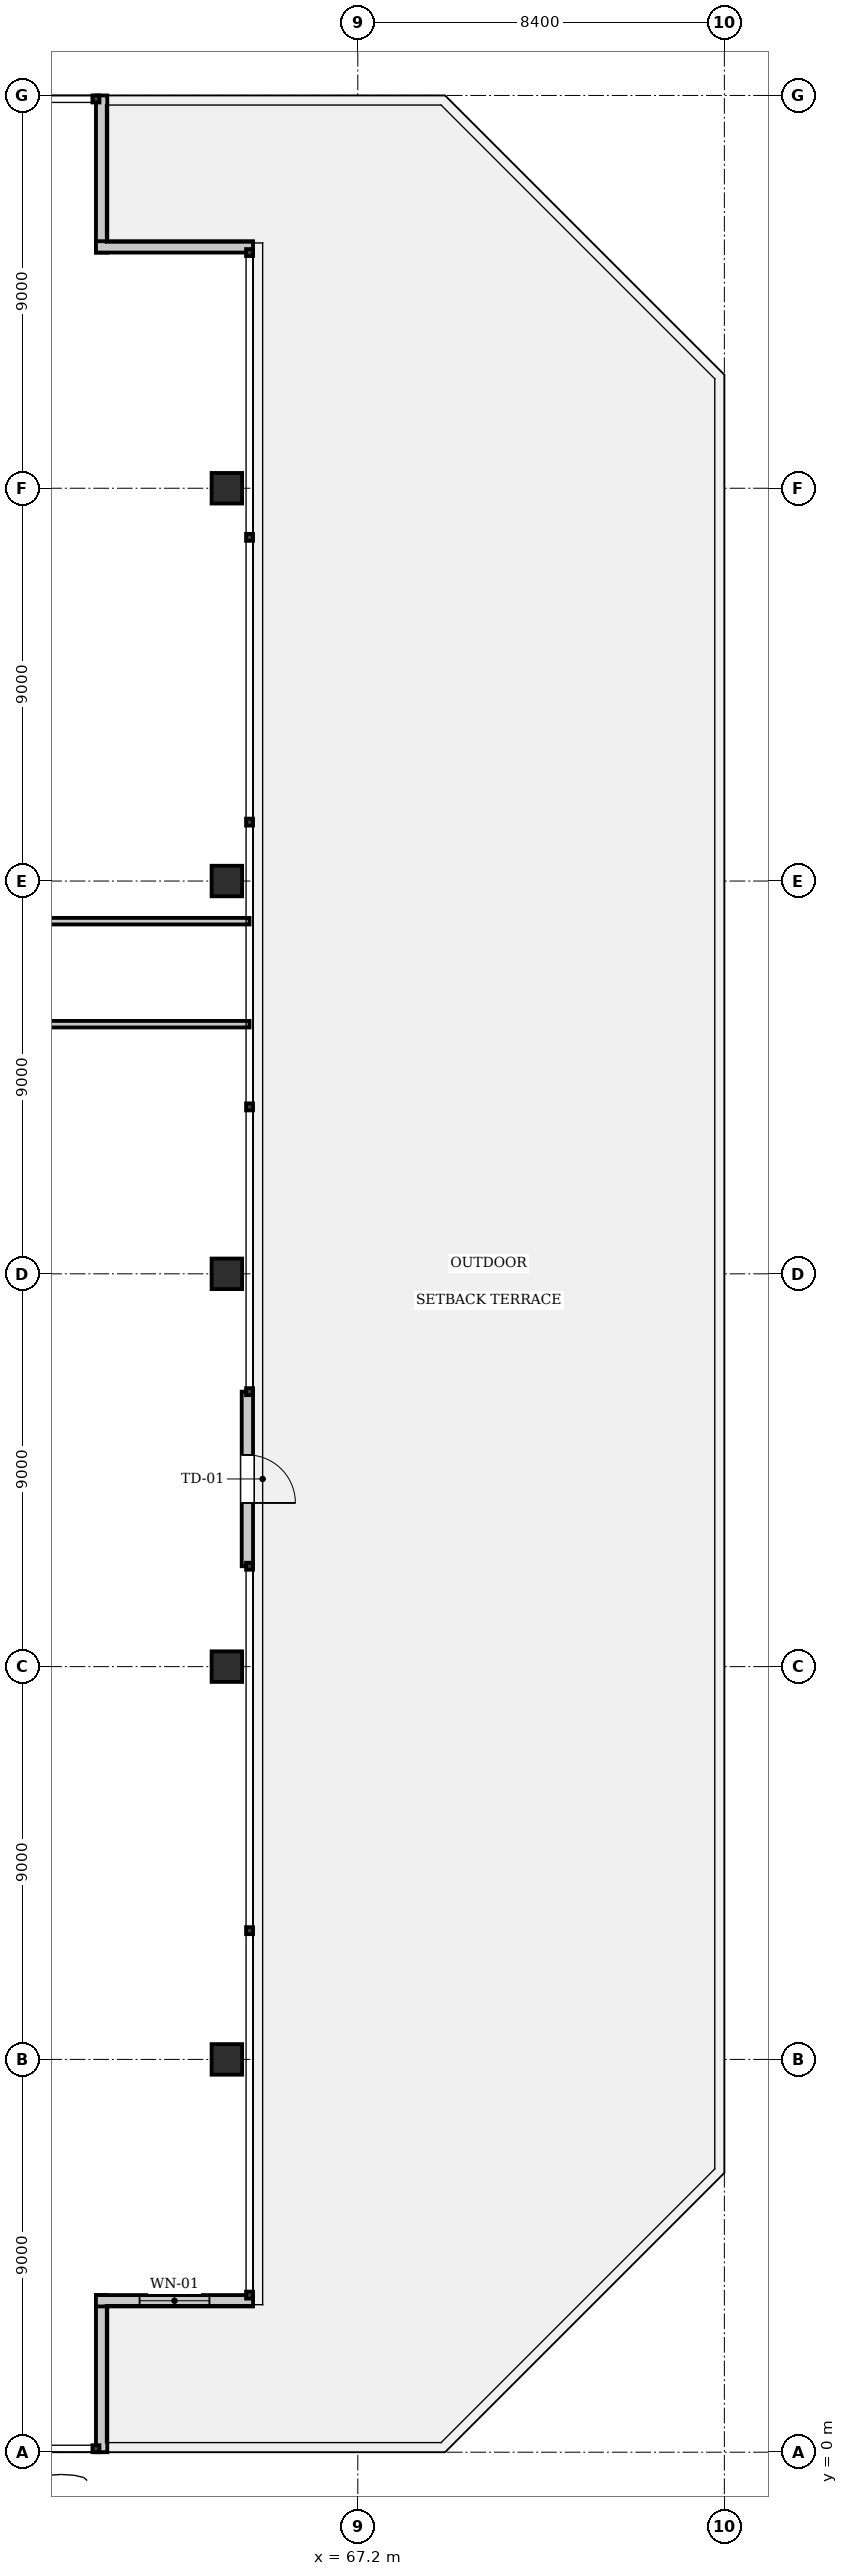
"""IFC4 building model, lengths in metres.
Left out: names, types, materials, properties, quantities, classifications, styles, units other than length and angle.
Written with IfcOpenShell. Run it as: python <this file> out.ifc"""

import sys

from ifc_helpers import new_model, si_unit, direction, frame, frame_2d, origin, origin_2d, place, context, subcontext, project, spatial, rectangle, i_section, extrude, element, fill, save


model = new_model("IFC4")
c1 = context("Model", 3, precision=1e-05, world=origin(), true_north=direction((0.0, 1.0)))
c2 = subcontext(c1, "Body", "Model", "MODEL_VIEW")
j1 = project(units=[si_unit("LENGTHUNIT", "METRE"), si_unit("PLANEANGLEUNIT", "RADIAN")], contexts=[c1])
p1 = place(None, origin())
s1 = spatial("IfcSite", under=j1, at=p1, CompositionType="ELEMENT")
p2 = place(p1, origin())
s2 = spatial("IfcBuilding", under=s1, at=p2, CompositionType="ELEMENT")
p3 = place(p2, frame((0.0, 0.0, 26.95)))
s3 = spatial("IfcBuildingStorey", under=s2, at=p3, CompositionType="ELEMENT", Elevation=26.95)
for number, where, z_axis, x_axis in (
    (1, (64.2, 9.0, -0.24), (0.0, 0.0, 1.0), (1.0, 0.0, 0.0)),
    (2, (64.2, 18.0, -0.24), (0.0, 0.0, 1.0), (1.0, 0.0, 0.0)),
    (3, (64.2, 27.0, -0.24), (0.0, 0.0, 1.0), (1.0, 0.0, 0.0)),
    (4, (64.2, 36.0, -0.24), (0.0, 0.0, 1.0), (1.0, 0.0, 0.0)),
    (5, (64.2, 45.0, -0.24), (0.0, 0.0, 1.0), (1.0, 0.0, 0.0)),
):
    element("IfcColumn", number, at=place(p3, frame(where, z_axis=z_axis, x_axis=x_axis)), inside=s3, PredefinedType="COLUMN", context=c2, shape_type="SweptSolid", body=[
        extrude(i_section(OverallWidth=0.7, OverallDepth=0.7, WebThickness=0.028, FlangeThickness=0.044, at=origin_2d()), origin(), (0.0, 0.0, 1.0), 4.09),
    ])
p4 = place(p3, frame((61.33, 3.6, 0.0), z_axis=(0.0, 0.0, 1.0), x_axis=(0.0, -1.0, 0.0)))
e6 = element("IfcWall", 6, at=p4, inside=s3, PredefinedType="SOLIDWALL", context=c2, shape_type="SweptSolid", body=[
    extrude(rectangle(XDim=3.6, YDim=0.26, at=frame_2d((1.8, 0.0))), origin(), (0.0, 0.0, 1.0), 3.61),
])
p5 = place(p3, frame((64.8, 3.47, 0.0), z_axis=(0.0, 0.0, 1.0), x_axis=(-1.0, 0.0, 0.0)))
e7 = element("IfcWall", 7, at=p5, inside=s3, PredefinedType="SOLIDWALL", context=c2, shape_type="SweptSolid", body=[
    extrude(rectangle(XDim=3.6, YDim=0.26, at=frame_2d((1.8, 0.0))), origin(), (0.0, 0.0, 1.0), 3.61),
])
p6 = place(p5, frame((1.0, 0.0, 0.9)))
e8 = element("IfcOpeningElement", 8, at=p6, cuts=e7, PredefinedType="OPENING", context=c2, shape_type="SweptSolid", body=[
    extrude(rectangle(XDim=1.6, YDim=2.1, at=frame_2d((0.8, 1.05))), frame((0.0, 0.14, 0.0), z_axis=(0.0, -1.0, 0.0), x_axis=(1.0, 0.0, 0.0)), (0.0, 0.0, 1.0), 0.28),
])
for number, where, z_axis, x_axis in (
    (9, (61.33, 54.0, 0.0), (0.0, 0.0, 1.0), (0.0, -1.0, 0.0)),
    (10, (61.2, 50.53, 0.0), (0.0, 0.0, 1.0), (1.0, 0.0, 0.0)),
):
    element("IfcWall", number, at=place(p3, frame(where, z_axis=z_axis, x_axis=x_axis)), inside=s3, PredefinedType="SOLIDWALL", context=c2, shape_type="SweptSolid", body=[
        extrude(rectangle(XDim=3.6, YDim=0.26, at=frame_2d((1.8, 0.0))), origin(), (0.0, 0.0, 1.0), 3.61),
    ])
p7 = place(p3, frame((64.67, 20.3, 0.0), z_axis=(0.0, 0.0, 1.0), x_axis=(0.0, 1.0, 0.0)))
e11 = element("IfcWall", 11, at=p7, inside=s3, PredefinedType="SOLIDWALL", context=c2, shape_type="SweptSolid", body=[
    extrude(rectangle(XDim=4.0, YDim=0.26, at=frame_2d((2.0, 0.0))), origin(), (0.0, 0.0, 1.0), 3.61),
])
p8 = place(p7, frame((1.45, 0.0, 0.0)))
e12 = element("IfcOpeningElement", 12, at=p8, cuts=e11, PredefinedType="OPENING", context=c2, shape_type="SweptSolid", body=[
    extrude(rectangle(XDim=1.1, YDim=2.2, at=frame_2d((0.55, 1.1))), frame((0.0, 0.14, 0.0), z_axis=(0.0, -1.0, 0.0), x_axis=(1.0, 0.0, 0.0)), (0.0, 0.0, 1.0), 0.28),
])
p9 = place(p3, frame((50.35, 32.72, 0.0), z_axis=(0.0, 0.0, 1.0), x_axis=(1.0, 0.0, 0.0)))
e13 = element("IfcWall", 13, at=p9, inside=s3, PredefinedType="PARTITIONING", context=c2, shape_type="SweptSolid", body=[
    extrude(rectangle(XDim=14.37, YDim=0.15, at=frame_2d((7.185, 0.0))), origin(), (0.0, 0.0, 1.0), 3.61),
])
p10 = place(p9, frame((6.485, 0.0, 0.0)))
e14 = element("IfcOpeningElement", 14, at=p10, cuts=e13, PredefinedType="OPENING", context=c2, shape_type="SweptSolid", body=[
    extrude(rectangle(XDim=1.4, YDim=2.2, at=frame_2d((0.7, 1.1))), frame((0.0, 0.085, 0.0), z_axis=(0.0, -1.0, 0.0), x_axis=(1.0, 0.0, 0.0)), (0.0, 0.0, 1.0), 0.17),
])
p11 = place(p3, frame((50.65, 35.08, 0.0), z_axis=(0.0, 0.0, 1.0), x_axis=(1.0, 0.0, 0.0)))
e15 = element("IfcWall", 15, at=p11, inside=s3, PredefinedType="PARTITIONING", context=c2, shape_type="SweptSolid", body=[
    extrude(rectangle(XDim=14.07, YDim=0.15, at=frame_2d((7.035, 0.0))), origin(), (0.0, 0.0, 1.0), 3.61),
])
p12 = place(p11, frame((6.465, 0.0, 0.0)))
e16 = element("IfcOpeningElement", 16, at=p12, cuts=e15, PredefinedType="OPENING", context=c2, shape_type="SweptSolid", body=[
    extrude(rectangle(XDim=0.9, YDim=2.1, at=frame_2d((0.45, 1.05))), frame((0.0, 0.085, 0.0), z_axis=(0.0, -1.0, 0.0), x_axis=(1.0, 0.0, 0.0)), (0.0, 0.0, 1.0), 0.17),
])
p13 = place(p6, origin())
e17 = element("IfcWindow", 17, at=p13, inside=s3, PartitioningType="SINGLE_PANEL", PredefinedType="WINDOW", context=c2, shape_type="SweptSolid", body=[
    extrude(rectangle(XDim=1.6, YDim=2.1, at=frame_2d((0.8, 1.05))), frame((0.0, 0.03, 0.0), z_axis=(0.0, -1.0, 0.0), x_axis=(1.0, 0.0, 0.0)), (0.0, 0.0, 1.0), 0.06),
])
fill(e8, e17)
p14 = place(p8, frame((1.1, 0.0, 0.0), z_axis=(0.0, 0.0, 1.0), x_axis=(-1.0, 0.0, 0.0)))
e18 = element("IfcDoor", 18, at=p14, inside=s3, OperationType="SINGLE_SWING_RIGHT", PredefinedType="DOOR", context=c2, shape_type="SweptSolid", body=[
    extrude(rectangle(XDim=1.1, YDim=2.2, at=frame_2d((0.55, 1.1))), frame((0.0, 0.025, 0.0), z_axis=(0.0, -1.0, 0.0), x_axis=(1.0, 0.0, 0.0)), (0.0, 0.0, 1.0), 0.05),
])
fill(e12, e18)
save(model, sys.argv[1])
